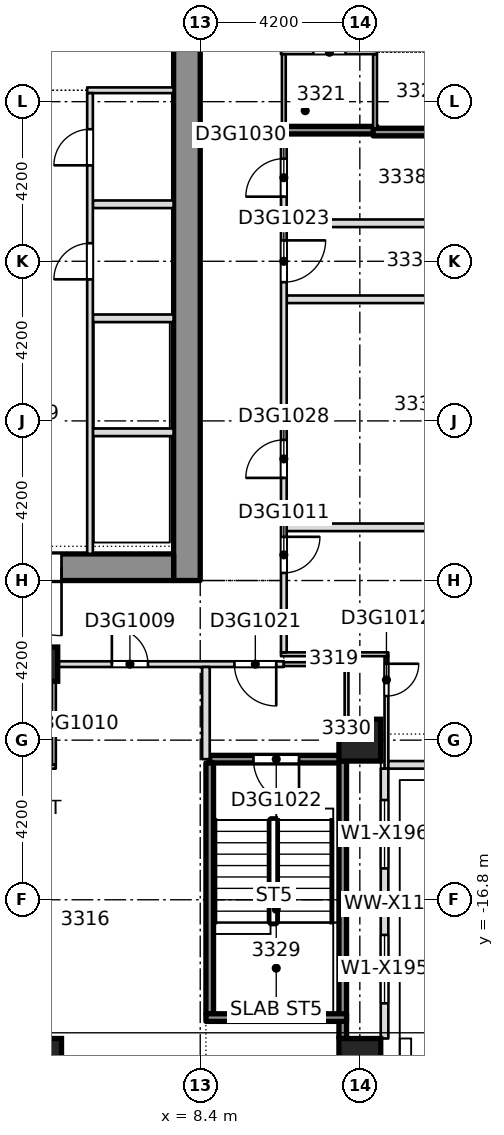
"""IFC4 building model, lengths in metres.
Left out: names, types, materials, properties, quantities, classifications, styles, units other than length and angle.
Written with IfcOpenShell. Run it as: python <this file> out.ifc"""

import sys

from ifc_helpers import new_model, si_unit, direction, frame, frame_2d, origin, origin_2d, place, context, subcontext, project, spatial, rectangle, extrude, element, fill, save


model = new_model("IFC4")
c1 = context("Model", 3, precision=1e-05, world=origin(), true_north=direction((0.0, 1.0)))
c2 = subcontext(c1, "Body", "Model", "MODEL_VIEW")
j1 = project(units=[si_unit("LENGTHUNIT", "METRE"), si_unit("PLANEANGLEUNIT", "RADIAN")], contexts=[c1])
p1 = place(None, origin())
s1 = spatial("IfcSite", under=j1, at=p1, CompositionType="ELEMENT")
p2 = place(p1, origin())
s2 = spatial("IfcBuilding", under=s1, at=p2, CompositionType="ELEMENT")
p3 = place(p2, frame((0.0, 0.0, 133.1)))
s3 = spatial("IfcBuildingStorey", under=s2, at=p3, CompositionType="ELEMENT", Elevation=133.1)
p4 = place(p3, frame((8.05, -8.4, -0.4), z_axis=(0.0, 0.0, 1.0), x_axis=(0.0, 1.0, 0.0)))
e1 = element("IfcWall", 1, at=p4, inside=s3, PredefinedType="SOLIDWALL", context=c2, shape_type="SweptSolid", body=[
    extrude(rectangle(XDim=30.15, YDim=0.7, at=frame_2d((15.075, 0.0))), origin(), (0.0, 0.0, 1.0), 3.45),
])
p5 = place(p4, frame((19.3, 0.0, 0.4)))
e2 = element("IfcOpeningElement", 2, at=p5, cuts=e1, PredefinedType="OPENING", context=c2, shape_type="SweptSolid", body=[
    extrude(rectangle(XDim=1.2, YDim=2.1, at=frame_2d((0.6, 1.05))), frame((0.0, 0.36, 0.0), z_axis=(0.0, -1.0, 0.0), x_axis=(1.0, 0.0, 0.0)), (0.0, 0.0, 1.0), 0.72),
])
p6 = place(p3, frame((-7.7, -8.05, -0.4), z_axis=(0.0, 0.0, 1.0), x_axis=(1.0, 0.0, 0.0)))
e3 = element("IfcWall", 3, at=p6, inside=s3, PredefinedType="SHEAR", context=c2, shape_type="SweptSolid", body=[
    extrude(rectangle(XDim=15.4, YDim=0.7, at=frame_2d((7.7, 0.0))), origin(), (0.0, 0.0, 1.0), 3.45),
])
p7 = place(p6, frame((2.95, 0.0, 0.4)))
e4 = element("IfcOpeningElement", 4, at=p7, cuts=e3, PredefinedType="OPENING", context=c2, shape_type="SweptSolid", body=[
    extrude(rectangle(XDim=1.8, YDim=2.1, at=frame_2d((0.9, 1.05))), frame((0.0, 0.36, 0.0), z_axis=(0.0, -1.0, 0.0), x_axis=(1.0, 0.0, 0.0)), (0.0, 0.0, 1.0), 0.72),
])
p8 = place(p6, frame((10.65, 0.0, 0.4)))
e5 = element("IfcOpeningElement", 5, at=p8, cuts=e3, PredefinedType="OPENING", context=c2, shape_type="SweptSolid", body=[
    extrude(rectangle(XDim=1.8, YDim=2.1, at=frame_2d((0.9, 1.05))), frame((0.0, 0.36, 0.0), z_axis=(0.0, -1.0, 0.0), x_axis=(1.0, 0.0, 0.0)), (0.0, 0.0, 1.0), 0.72),
])
for number, where, z_axis, x_axis in (
    (6, (4.2, -21.0, -0.4), (0.0, 0.0, 1.0), (1.0, 0.0, 0.0)),
    (7, (12.6, -21.0, -0.4), (0.0, 0.0, 1.0), (1.0, 0.0, 0.0)),
    (8, (12.6, -12.6, -0.4), (0.0, 0.0, 1.0), (1.0, 0.0, 0.0)),
):
    element("IfcColumn", number, at=place(p3, frame(where, z_axis=z_axis, x_axis=x_axis)), inside=s3, PredefinedType="COLUMN", context=c2, shape_type="SweptSolid", body=[
        extrude(rectangle(XDim=1.1, YDim=1.1, at=origin_2d()), origin(), (0.0, 0.0, 1.0), 3.45),
    ])
p9 = place(p3, frame((4.2, -10.6, -0.4), z_axis=(0.0, 0.0, 1.0), x_axis=(1.0, 0.0, 0.0)))
e9 = element("IfcColumn", 9, at=p9, inside=s3, PredefinedType="COLUMN", context=c2, shape_type="SweptSolid", body=[
    extrude(rectangle(XDim=0.9, YDim=0.9, at=origin_2d()), origin(), (0.0, 0.0, 1.0), 3.45),
])
p10 = place(p3, frame((1.802, -13.3, 0.0), z_axis=(0.0, 0.0, 1.0), x_axis=(1.0, 0.0, 0.0)))
e10 = element("IfcWall", 10, at=p10, inside=s3, PredefinedType="PARTITIONING", context=c2, shape_type="SweptSolid", body=[
    extrude(rectangle(XDim=2.796, YDim=0.1, at=frame_2d((1.398, 0.0))), origin(), (0.0, 0.0, 1.0), 3.05),
])
p11 = place(p10, frame((1.698, 0.0, 0.0)))
e11 = element("IfcOpeningElement", 11, at=p11, cuts=e10, PredefinedType="OPENING", context=c2, shape_type="SweptSolid", body=[
    extrude(rectangle(XDim=0.85, YDim=2.1, at=frame_2d((0.425, 1.05))), frame((0.0, 0.06, 0.0), z_axis=(0.0, -1.0, 0.0), x_axis=(1.0, 0.0, 0.0)), (0.0, 0.0, 1.0), 0.12),
])
p12 = place(p3, frame((8.65, -13.1, 0.0), z_axis=(0.0, 0.0, 1.0), x_axis=(1.0, 0.0, 0.0)))
e12 = element("IfcWall", 12, at=p12, inside=s3, PredefinedType="SOLIDWALL", context=c2, shape_type="SweptSolid", body=[
    extrude(rectangle(XDim=3.5, YDim=0.2, at=frame_2d((1.75, 0.0))), origin(), (0.0, 0.0, 1.0), 3.05),
])
p13 = place(p12, frame((1.15, 0.0, 0.0)))
e13 = element("IfcOpeningElement", 13, at=p13, cuts=e12, PredefinedType="OPENING", context=c2, shape_type="SweptSolid", body=[
    extrude(rectangle(XDim=1.2, YDim=2.1, at=frame_2d((0.6, 1.05))), frame((0.0, 0.11, 0.0), z_axis=(0.0, -1.0, 0.0), x_axis=(1.0, 0.0, 0.0)), (0.0, 0.0, 1.0), 0.22),
])
p14 = place(p3, frame((1.8, -10.6, 0.0), z_axis=(0.0, 0.0, 1.0), x_axis=(1.0, 0.0, 0.0)))
e14 = element("IfcWall", 14, at=p14, inside=s3, PredefinedType="PARTITIONING", context=c2, shape_type="SweptSolid", body=[
    extrude(rectangle(XDim=2.8, YDim=0.1, at=frame_2d((1.4, 0.0))), origin(), (0.0, 0.0, 1.0), 3.05),
])
p15 = place(p3, frame((4.5, -10.6, 0.0), z_axis=(0.0, 0.0, 1.0), x_axis=(1.0, 0.0, 0.0)))
e15 = element("IfcWall", 15, at=p15, inside=s3, PredefinedType="PARTITIONING", context=c2, shape_type="SweptSolid", body=[
    extrude(rectangle(XDim=6.1, YDim=0.15, at=frame_2d((3.05, 0.0))), origin(), (0.0, 0.0, 1.0), 3.05),
])
p16 = place(p15, frame((1.575, 0.0, 0.0)))
e16 = element("IfcOpeningElement", 16, at=p16, cuts=e15, PredefinedType="OPENING", context=c2, shape_type="SweptSolid", body=[
    extrude(rectangle(XDim=0.95, YDim=2.1, at=frame_2d((0.475, 1.05))), frame((0.0, 0.085, 0.0), z_axis=(0.0, -1.0, 0.0), x_axis=(1.0, 0.0, 0.0)), (0.0, 0.0, 1.0), 0.17),
])
p17 = place(p15, frame((4.8, 0.0, 0.0)))
e17 = element("IfcOpeningElement", 17, at=p17, cuts=e15, PredefinedType="OPENING", context=c2, shape_type="SweptSolid", body=[
    extrude(rectangle(XDim=1.1, YDim=2.1, at=frame_2d((0.55, 1.05))), frame((0.0, 0.085, 0.0), z_axis=(0.0, -1.0, 0.0), x_axis=(1.0, 0.0, 0.0)), (0.0, 0.0, 1.0), 0.17),
])
p18 = place(p3, frame((10.6, -10.6, 0.0), z_axis=(0.0, 0.0, 1.0), x_axis=(1.0, 0.0, 0.0)))
e18 = element("IfcWall", 18, at=p18, inside=s3, PredefinedType="PARTITIONING", context=c2, shape_type="SweptSolid", body=[
    extrude(rectangle(XDim=1.7, YDim=0.1, at=frame_2d((0.85, 0.0))), origin(), (0.0, 0.0, 1.0), 3.05),
])
p19 = place(p3, frame((10.525, -10.34, 0.0), z_axis=(0.0, 0.0, 1.0), x_axis=(1.0, 0.0, 0.0)))
e19 = element("IfcWall", 19, at=p19, inside=s3, PredefinedType="PARTITIONING", context=c2, shape_type="SweptSolid", body=[
    extrude(rectangle(XDim=2.825, YDim=0.1, at=frame_2d((1.413, 0.0))), origin(), (0.0, 0.0, 1.0), 3.05),
])
p20 = place(p3, frame((10.675, -7.0, 0.0), z_axis=(0.0, 0.0, 1.0), x_axis=(1.0, 0.0, 0.0)))
e20 = element("IfcWall", 20, at=p20, inside=s3, PredefinedType="PARTITIONING", context=c2, shape_type="SweptSolid", body=[
    extrude(rectangle(XDim=10.875, YDim=0.2, at=frame_2d((5.438, 0.0))), origin(), (0.0, 0.0, 1.0), 3.05),
])
p21 = place(p3, frame((10.677, -1.0, 0.0), z_axis=(0.0, 0.0, 1.0), x_axis=(1.0, 0.0, 0.0)))
e21 = element("IfcWall", 21, at=p21, inside=s3, PredefinedType="PARTITIONING", context=c2, shape_type="SweptSolid", body=[
    extrude(rectangle(XDim=6.071, YDim=0.2, at=frame_2d((3.036, 0.0))), origin(), (0.0, 0.0, 1.0), 3.05),
])
p22 = place(p3, frame((10.675, 1.0, 0.0), z_axis=(0.0, 0.0, 1.0), x_axis=(1.0, 0.0, 0.0)))
e22 = element("IfcWall", 22, at=p22, inside=s3, PredefinedType="PARTITIONING", context=c2, shape_type="SweptSolid", body=[
    extrude(rectangle(XDim=6.075, YDim=0.2, at=frame_2d((3.038, 0.0))), origin(), (0.0, 0.0, 1.0), 3.05),
])
p23 = place(p3, frame((10.525, 3.45, 0.0), z_axis=(0.0, 0.0, 1.0), x_axis=(1.0, 0.0, 0.0)))
e23 = element("IfcWall", 23, at=p23, inside=s3, PredefinedType="SOLIDWALL", context=c2, shape_type="SweptSolid", body=[
    extrude(rectangle(XDim=2.525, YDim=0.2, at=frame_2d((1.263, 0.0))), origin(), (0.0, 0.0, 1.0), 3.05),
])
p24 = place(p3, frame((12.95, 3.4, 0.0), z_axis=(0.0, 0.0, 1.0), x_axis=(1.0, 0.0, 0.0)))
e24 = element("IfcWall", 24, at=p24, inside=s3, PredefinedType="SOLIDWALL", context=c2, shape_type="SweptSolid", body=[
    extrude(rectangle(XDim=8.6, YDim=0.2, at=frame_2d((4.3, 0.0))), origin(), (0.0, 0.0, 1.0), 3.05),
])
p25 = place(p3, frame((10.525, 5.5, 0.0), z_axis=(0.0, 0.0, 1.0), x_axis=(1.0, 0.0, 0.0)))
e25 = element("IfcWall", 25, at=p25, inside=s3, PredefinedType="PARTITIONING", context=c2, shape_type="SweptSolid", body=[
    extrude(rectangle(XDim=2.525, YDim=0.1, at=frame_2d((1.263, 0.0))), origin(), (0.0, 0.0, 1.0), 3.05),
])
p26 = place(p25, frame((0.85, 0.0, 0.0)))
e26 = element("IfcOpeningElement", 26, at=p26, cuts=e25, PredefinedType="OPENING", context=c2, shape_type="SweptSolid", body=[
    extrude(rectangle(XDim=0.85, YDim=2.1, at=frame_2d((0.425, 1.05))), frame((0.0, 0.06, 0.0), z_axis=(0.0, -1.0, 0.0), x_axis=(1.0, 0.0, 0.0)), (0.0, 0.0, 1.0), 0.12),
])
p27 = place(p3, frame((4.55, -13.248, 0.0), z_axis=(0.0, 0.0, 1.0), x_axis=(0.0, 1.0, 0.0)))
e27 = element("IfcWall", 27, at=p27, inside=s3, PredefinedType="PARTITIONING", context=c2, shape_type="SweptSolid", body=[
    extrude(rectangle(XDim=2.573, YDim=0.1, at=frame_2d((1.287, 0.0))), origin(), (0.0, 0.0, 1.0), 3.05),
])
p28 = place(p3, frame((8.55, -13.1, 0.0), z_axis=(0.0, 0.0, 1.0), x_axis=(0.0, 1.0, 0.0)))
e28 = element("IfcWall", 28, at=p28, inside=s3, PredefinedType="PARTITIONING", context=c2, shape_type="SweptSolid", body=[
    extrude(rectangle(XDim=2.425, YDim=0.2, at=frame_2d((1.212, 0.0))), origin(), (0.0, 0.0, 1.0), 3.05),
])
p29 = place(p3, frame((10.6, -10.29, 0.0), z_axis=(0.0, 0.0, 1.0), x_axis=(0.0, 1.0, 0.0)))
e29 = element("IfcWall", 29, at=p29, inside=s3, PredefinedType="PARTITIONING", context=c2, shape_type="SweptSolid", body=[
    extrude(rectangle(XDim=13.64, YDim=0.15, at=frame_2d((6.82, 0.0))), origin(), (0.0, 0.0, 1.0), 3.05),
])
p30 = place(p29, frame((2.09, 0.0, 0.0)))
e30 = element("IfcOpeningElement", 30, at=p30, cuts=e29, PredefinedType="OPENING", context=c2, shape_type="SweptSolid", body=[
    extrude(rectangle(XDim=0.95, YDim=2.1, at=frame_2d((0.475, 1.05))), frame((0.0, 0.085, 0.0), z_axis=(0.0, -1.0, 0.0), x_axis=(1.0, 0.0, 0.0)), (0.0, 0.0, 1.0), 0.17),
])
p31 = place(p29, frame((9.74, 0.0, 0.0)))
e31 = element("IfcOpeningElement", 31, at=p31, cuts=e29, PredefinedType="OPENING", context=c2, shape_type="SweptSolid", body=[
    extrude(rectangle(XDim=1.1, YDim=2.1, at=frame_2d((0.55, 1.05))), frame((0.0, 0.085, 0.0), z_axis=(0.0, -1.0, 0.0), x_axis=(1.0, 0.0, 0.0)), (0.0, 0.0, 1.0), 0.17),
])
p32 = place(p29, frame((4.59, 0.0, 0.0)))
e32 = element("IfcOpeningElement", 32, at=p32, cuts=e29, PredefinedType="OPENING", context=c2, shape_type="SweptSolid", body=[
    extrude(rectangle(XDim=1.0, YDim=2.1, at=frame_2d((0.5, 1.05))), frame((0.0, 0.085, 0.0), z_axis=(0.0, -1.0, 0.0), x_axis=(1.0, 0.0, 0.0)), (0.0, 0.0, 1.0), 0.17),
])
p33 = place(p29, frame((11.99, 0.0, 0.0)))
e33 = element("IfcOpeningElement", 33, at=p33, cuts=e29, PredefinedType="OPENING", context=c2, shape_type="SweptSolid", body=[
    extrude(rectangle(XDim=1.0, YDim=2.1, at=frame_2d((0.5, 1.05))), frame((0.0, 0.085, 0.0), z_axis=(0.0, -1.0, 0.0), x_axis=(1.0, 0.0, 0.0)), (0.0, 0.0, 1.0), 0.17),
])
p34 = place(p3, frame((10.6, 3.45, 0.0), z_axis=(0.0, 0.0, 1.0), x_axis=(0.0, 1.0, 0.0)))
e34 = element("IfcWall", 34, at=p34, inside=s3, PredefinedType="PARTITIONING", context=c2, shape_type="SweptSolid", body=[
    extrude(rectangle(XDim=2.0, YDim=0.1, at=frame_2d((1.0, 0.0))), origin(), (0.0, 0.0, 1.0), 3.05),
])
p35 = place(p3, frame((12.25, -12.44, 0.0), z_axis=(0.0, 0.0, 1.0), x_axis=(0.0, 1.0, 0.0)))
e35 = element("IfcWall", 35, at=p35, inside=s3, PredefinedType="PARTITIONING", context=c2, shape_type="SweptSolid", body=[
    extrude(rectangle(XDim=1.79, YDim=0.1, at=frame_2d((0.895, 0.0))), origin(), (0.0, 0.0, 1.0), 3.05),
])
p36 = place(p3, frame((13.0, 3.5, 0.0), z_axis=(0.0, 0.0, 1.0), x_axis=(0.0, 1.0, 0.0)))
e36 = element("IfcWall", 36, at=p36, inside=s3, PredefinedType="PARTITIONING", context=c2, shape_type="SweptSolid", body=[
    extrude(rectangle(XDim=1.95, YDim=0.1, at=frame_2d((0.975, 0.0))), origin(), (0.0, 0.0, 1.0), 3.05),
])
p37 = place(p3, frame((13.3, -13.35, 0.0), z_axis=(0.0, 0.0, 1.0), x_axis=(0.0, 1.0, 0.0)))
e37 = element("IfcWall", 37, at=p37, inside=s3, PredefinedType="PARTITIONING", context=c2, shape_type="SweptSolid", body=[
    extrude(rectangle(XDim=2.96, YDim=0.1, at=frame_2d((1.48, 0.0))), origin(), (0.0, 0.0, 1.0), 3.05),
])
p38 = place(p37, frame((1.91, 0.0, 0.0)))
e38 = element("IfcOpeningElement", 38, at=p38, cuts=e37, PredefinedType="OPENING", context=c2, shape_type="SweptSolid", body=[
    extrude(rectangle(XDim=0.85, YDim=2.1, at=frame_2d((0.425, 1.05))), frame((0.0, 0.06, 0.0), z_axis=(0.0, -1.0, 0.0), x_axis=(1.0, 0.0, 0.0)), (0.0, 0.0, 1.0), 0.12),
])
p39 = place(p3, frame((13.25, -20.45, 0.0), z_axis=(0.0, 0.0, 1.0), x_axis=(0.0, 1.0, 0.0)))
e39 = element("IfcWall", 39, at=p39, inside=s3, PredefinedType="STANDARD", context=c2, shape_type="SweptSolid", body=[
    extrude(rectangle(XDim=7.1, YDim=0.2, at=frame_2d((3.55, 0.0))), origin(), (0.0, 0.0, 1.0), 3.05),
])
p40 = place(p39, frame((0.925, 0.0, 0.2)))
e40 = element("IfcOpeningElement", 40, at=p40, cuts=e39, PredefinedType="OPENING", context=c2, shape_type="SweptSolid", body=[
    extrude(rectangle(XDim=1.8, YDim=2.65, at=frame_2d((0.9, 1.325))), frame((0.0, 0.11, 0.0), z_axis=(0.0, -1.0, 0.0), x_axis=(1.0, 0.0, 0.0)), (0.0, 0.0, 1.0), 0.22),
])
p41 = place(p39, frame((4.475, 0.0, 0.2)))
e41 = element("IfcOpeningElement", 41, at=p41, cuts=e39, PredefinedType="OPENING", context=c2, shape_type="SweptSolid", body=[
    extrude(rectangle(XDim=1.8, YDim=2.65, at=frame_2d((0.9, 1.325))), frame((0.0, 0.11, 0.0), z_axis=(0.0, -1.0, 0.0), x_axis=(1.0, 0.0, 0.0)), (0.0, 0.0, 1.0), 0.22),
])
p42 = place(p3, frame((13.35, -13.25, 0.0), z_axis=(0.0, 0.0, 1.0), x_axis=(1.0, 0.0, 0.0)))
e42 = element("IfcWall", 42, at=p42, inside=s3, PredefinedType="STANDARD", context=c2, shape_type="SweptSolid", body=[
    extrude(rectangle(XDim=7.1, YDim=0.2, at=frame_2d((3.55, 0.0))), origin(), (0.0, 0.0, 1.0), 3.05),
])
for number, where, z_axis, x_axis in (
    (43, (5.575, -4.5, 0.0), (0.0, 0.0, 1.0), (1.0, 0.0, 0.0)),
    (44, (5.575, -1.5, 0.0), (0.0, 0.0, 1.0), (1.0, 0.0, 0.0)),
    (45, (5.575, 1.5, 0.0), (0.0, 0.0, 1.0), (1.0, 0.0, 0.0)),
):
    element("IfcWall", number, at=place(p3, frame(where, z_axis=z_axis, x_axis=x_axis)), inside=s3, PredefinedType="PARTITIONING", context=c2, shape_type="SweptSolid", body=[
        extrude(rectangle(XDim=2.124, YDim=0.2, at=frame_2d((1.062, 0.0))), origin(), (0.0, 0.0, 1.0), 3.05),
    ])
p43 = place(p3, frame((5.425, 4.5, 0.0), z_axis=(0.0, 0.0, 1.0), x_axis=(1.0, 0.0, 0.0)))
e46 = element("IfcWall", 46, at=p43, inside=s3, PredefinedType="PARTITIONING", context=c2, shape_type="SweptSolid", body=[
    extrude(rectangle(XDim=2.274, YDim=0.15, at=frame_2d((1.137, 0.0))), origin(), (0.0, 0.0, 1.0), 3.05),
])
p44 = place(p3, frame((5.5, -7.699, 0.0), z_axis=(0.0, 0.0, 1.0), x_axis=(0.0, 1.0, 0.0)))
e47 = element("IfcWall", 47, at=p44, inside=s3, PredefinedType="PARTITIONING", context=c2, shape_type="SweptSolid", body=[
    extrude(rectangle(XDim=12.124, YDim=0.15, at=frame_2d((6.062, 0.0))), origin(), (0.0, 0.0, 1.0), 3.05),
])
p45 = place(p44, frame((7.224, 0.0, 0.0)))
e48 = element("IfcOpeningElement", 48, at=p45, cuts=e47, PredefinedType="OPENING", context=c2, shape_type="SweptSolid", body=[
    extrude(rectangle(XDim=0.95, YDim=2.1, at=frame_2d((0.475, 1.05))), frame((0.0, 0.085, 0.0), z_axis=(0.0, -1.0, 0.0), x_axis=(1.0, 0.0, 0.0)), (0.0, 0.0, 1.0), 0.17),
])
p46 = place(p44, frame((10.224, 0.0, 0.0)))
e49 = element("IfcOpeningElement", 49, at=p46, cuts=e47, PredefinedType="OPENING", context=c2, shape_type="SweptSolid", body=[
    extrude(rectangle(XDim=0.95, YDim=2.1, at=frame_2d((0.475, 1.05))), frame((0.0, 0.085, 0.0), z_axis=(0.0, -1.0, 0.0), x_axis=(1.0, 0.0, 0.0)), (0.0, 0.0, 1.0), 0.17),
])
p47 = place(p3, frame((8.65, -19.8, 0.0), z_axis=(0.0, 0.0, 1.0), x_axis=(0.0, 1.0, 0.0)))
e50 = element("IfcWall", 50, at=p47, inside=s3, PredefinedType="SOLIDWALL", context=c2, shape_type="SweptSolid", body=[
    extrude(rectangle(XDim=6.6, YDim=0.2, at=frame_2d((3.3, 0.0))), origin(), (0.0, 0.0, 1.0), 3.05),
])
p48 = place(p3, frame((12.15, -20.45, 0.0), z_axis=(0.0, 0.0, 1.0), x_axis=(0.0, 1.0, 0.0)))
e51 = element("IfcWall", 51, at=p48, inside=s3, PredefinedType="SOLIDWALL", context=c2, shape_type="SweptSolid", body=[
    extrude(rectangle(XDim=7.3, YDim=0.2, at=frame_2d((3.65, 0.0))), origin(), (0.0, 0.0, 1.0), 3.05),
])
p49 = place(p3, frame((8.55, -19.9, 0.0), z_axis=(0.0, 0.0, 1.0), x_axis=(1.0, 0.0, 0.0)))
e52 = element("IfcWall", 52, at=p49, inside=s3, PredefinedType="SOLIDWALL", context=c2, shape_type="SweptSolid", body=[
    extrude(rectangle(XDim=3.7, YDim=0.2, at=frame_2d((1.85, 0.0))), origin(), (0.0, 0.0, 1.0), 3.05),
])
p50 = place(p16, origin())
e53 = element("IfcDoor", 53, at=p50, inside=s3, OperationType="SINGLE_SWING_LEFT", PredefinedType="DOOR", context=c2, shape_type="SweptSolid", body=[
    extrude(rectangle(XDim=0.95, YDim=2.1, at=frame_2d((0.475, 1.05))), frame((0.0, 0.025, 0.0), z_axis=(0.0, -1.0, 0.0), x_axis=(1.0, 0.0, 0.0)), (0.0, 0.0, 1.0), 0.05),
])
fill(e16, e53)
p51 = place(p30, origin())
e54 = element("IfcDoor", 54, at=p51, inside=s3, OperationType="SINGLE_SWING_LEFT", PredefinedType="DOOR", context=c2, shape_type="SweptSolid", body=[
    extrude(rectangle(XDim=0.95, YDim=2.1, at=frame_2d((0.475, 1.05))), frame((0.0, 0.025, 0.0), z_axis=(0.0, -1.0, 0.0), x_axis=(1.0, 0.0, 0.0)), (0.0, 0.0, 1.0), 0.05),
])
fill(e30, e54)
p52 = place(p38, origin())
e55 = element("IfcDoor", 55, at=p52, inside=s3, OperationType="SINGLE_SWING_LEFT", PredefinedType="DOOR", context=c2, shape_type="SweptSolid", body=[
    extrude(rectangle(XDim=0.85, YDim=2.1, at=frame_2d((0.425, 1.05))), frame((0.0, 0.025, 0.0), z_axis=(0.0, -1.0, 0.0), x_axis=(1.0, 0.0, 0.0)), (0.0, 0.0, 1.0), 0.05),
])
fill(e38, e55)
p53 = place(p26, origin())
e56 = element("IfcDoor", 56, at=p53, inside=s3, OperationType="SINGLE_SWING_RIGHT", PredefinedType="DOOR", context=c2, shape_type="SweptSolid", body=[
    extrude(rectangle(XDim=0.85, YDim=2.1, at=frame_2d((0.425, 1.05))), frame((0.0, 0.025, 0.0), z_axis=(0.0, -1.0, 0.0), x_axis=(1.0, 0.0, 0.0)), (0.0, 0.0, 1.0), 0.05),
])
fill(e26, e56)
p54 = place(p17, origin())
e57 = element("IfcDoor", 57, at=p54, inside=s3, OperationType="SINGLE_SWING_RIGHT", PredefinedType="DOOR", context=c2, shape_type="SweptSolid", body=[
    extrude(rectangle(XDim=1.1, YDim=2.1, at=frame_2d((0.55, 1.05))), frame((0.0, 0.025, 0.0), z_axis=(0.0, -1.0, 0.0), x_axis=(1.0, 0.0, 0.0)), (0.0, 0.0, 1.0), 0.05),
])
fill(e17, e57)
p55 = place(p13, origin())
e58 = element("IfcDoor", 58, at=p55, inside=s3, OperationType="SINGLE_SWING_RIGHT", PredefinedType="DOOR", context=c2, shape_type="SweptSolid", body=[
    extrude(rectangle(XDim=1.2, YDim=2.1, at=frame_2d((0.6, 1.05))), frame((0.0, 0.025, 0.0), z_axis=(0.0, -1.0, 0.0), x_axis=(1.0, 0.0, 0.0)), (0.0, 0.0, 1.0), 0.05),
])
fill(e13, e58)
p56 = place(p31, origin())
e59 = element("IfcDoor", 59, at=p56, inside=s3, OperationType="SINGLE_SWING_LEFT", PredefinedType="DOOR", context=c2, shape_type="SweptSolid", body=[
    extrude(rectangle(XDim=1.1, YDim=2.1, at=frame_2d((0.55, 1.05))), frame((0.0, 0.025, 0.0), z_axis=(0.0, -1.0, 0.0), x_axis=(1.0, 0.0, 0.0)), (0.0, 0.0, 1.0), 0.05),
])
fill(e31, e59)
p57 = place(p32, origin())
e60 = element("IfcDoor", 60, at=p57, inside=s3, OperationType="SINGLE_SWING_RIGHT", PredefinedType="DOOR", context=c2, shape_type="SweptSolid", body=[
    extrude(rectangle(XDim=1.0, YDim=2.1, at=frame_2d((0.5, 1.05))), frame((0.0, 0.025, 0.0), z_axis=(0.0, -1.0, 0.0), x_axis=(1.0, 0.0, 0.0)), (0.0, 0.0, 1.0), 0.05),
])
fill(e32, e60)
p58 = place(p33, origin())
e61 = element("IfcDoor", 61, at=p58, inside=s3, OperationType="SINGLE_SWING_LEFT", PredefinedType="DOOR", context=c2, shape_type="SweptSolid", body=[
    extrude(rectangle(XDim=1.0, YDim=2.1, at=frame_2d((0.5, 1.05))), frame((0.0, 0.025, 0.0), z_axis=(0.0, -1.0, 0.0), x_axis=(1.0, 0.0, 0.0)), (0.0, 0.0, 1.0), 0.05),
])
fill(e33, e61)
p59 = place(p40, origin())
e62 = element("IfcWindow", 62, at=p59, inside=s3, PartitioningType="SINGLE_PANEL", PredefinedType="WINDOW", context=c2, shape_type="SweptSolid", body=[
    extrude(rectangle(XDim=1.8, YDim=2.65, at=frame_2d((0.9, 1.325))), frame((0.0, 0.03, 0.0), z_axis=(0.0, -1.0, 0.0), x_axis=(1.0, 0.0, 0.0)), (0.0, 0.0, 1.0), 0.06),
])
fill(e40, e62)
p60 = place(p41, origin())
e63 = element("IfcWindow", 63, at=p60, inside=s3, PartitioningType="SINGLE_PANEL", PredefinedType="WINDOW", context=c2, shape_type="SweptSolid", body=[
    extrude(rectangle(XDim=1.8, YDim=2.65, at=frame_2d((0.9, 1.325))), frame((0.0, 0.03, 0.0), z_axis=(0.0, -1.0, 0.0), x_axis=(1.0, 0.0, 0.0)), (0.0, 0.0, 1.0), 0.06),
])
fill(e41, e63)
p61 = place(p45, origin())
e64 = element("IfcDoor", 64, at=p61, inside=s3, OperationType="SINGLE_SWING_RIGHT", PredefinedType="DOOR", context=c2, shape_type="SweptSolid", body=[
    extrude(rectangle(XDim=0.95, YDim=2.1, at=frame_2d((0.475, 1.05))), frame((0.0, 0.025, 0.0), z_axis=(0.0, -1.0, 0.0), x_axis=(1.0, 0.0, 0.0)), (0.0, 0.0, 1.0), 0.05),
])
fill(e48, e64)
p62 = place(p46, origin())
e65 = element("IfcDoor", 65, at=p62, inside=s3, OperationType="SINGLE_SWING_RIGHT", PredefinedType="DOOR", context=c2, shape_type="SweptSolid", body=[
    extrude(rectangle(XDim=0.95, YDim=2.1, at=frame_2d((0.475, 1.05))), frame((0.0, 0.025, 0.0), z_axis=(0.0, -1.0, 0.0), x_axis=(1.0, 0.0, 0.0)), (0.0, 0.0, 1.0), 0.05),
])
fill(e49, e65)
p63 = place(p8, origin())
e66 = element("IfcDoor", 66, at=p63, inside=s3, OperationType="SINGLE_SWING_LEFT", PredefinedType="DOOR", context=c2, shape_type="SweptSolid", body=[
    extrude(rectangle(XDim=1.8, YDim=2.1, at=frame_2d((0.9, 1.05))), frame((0.0, 0.025, 0.0), z_axis=(0.0, -1.0, 0.0), x_axis=(1.0, 0.0, 0.0)), (0.0, 0.0, 1.0), 0.05),
])
fill(e5, e66)
save(model, sys.argv[1])
